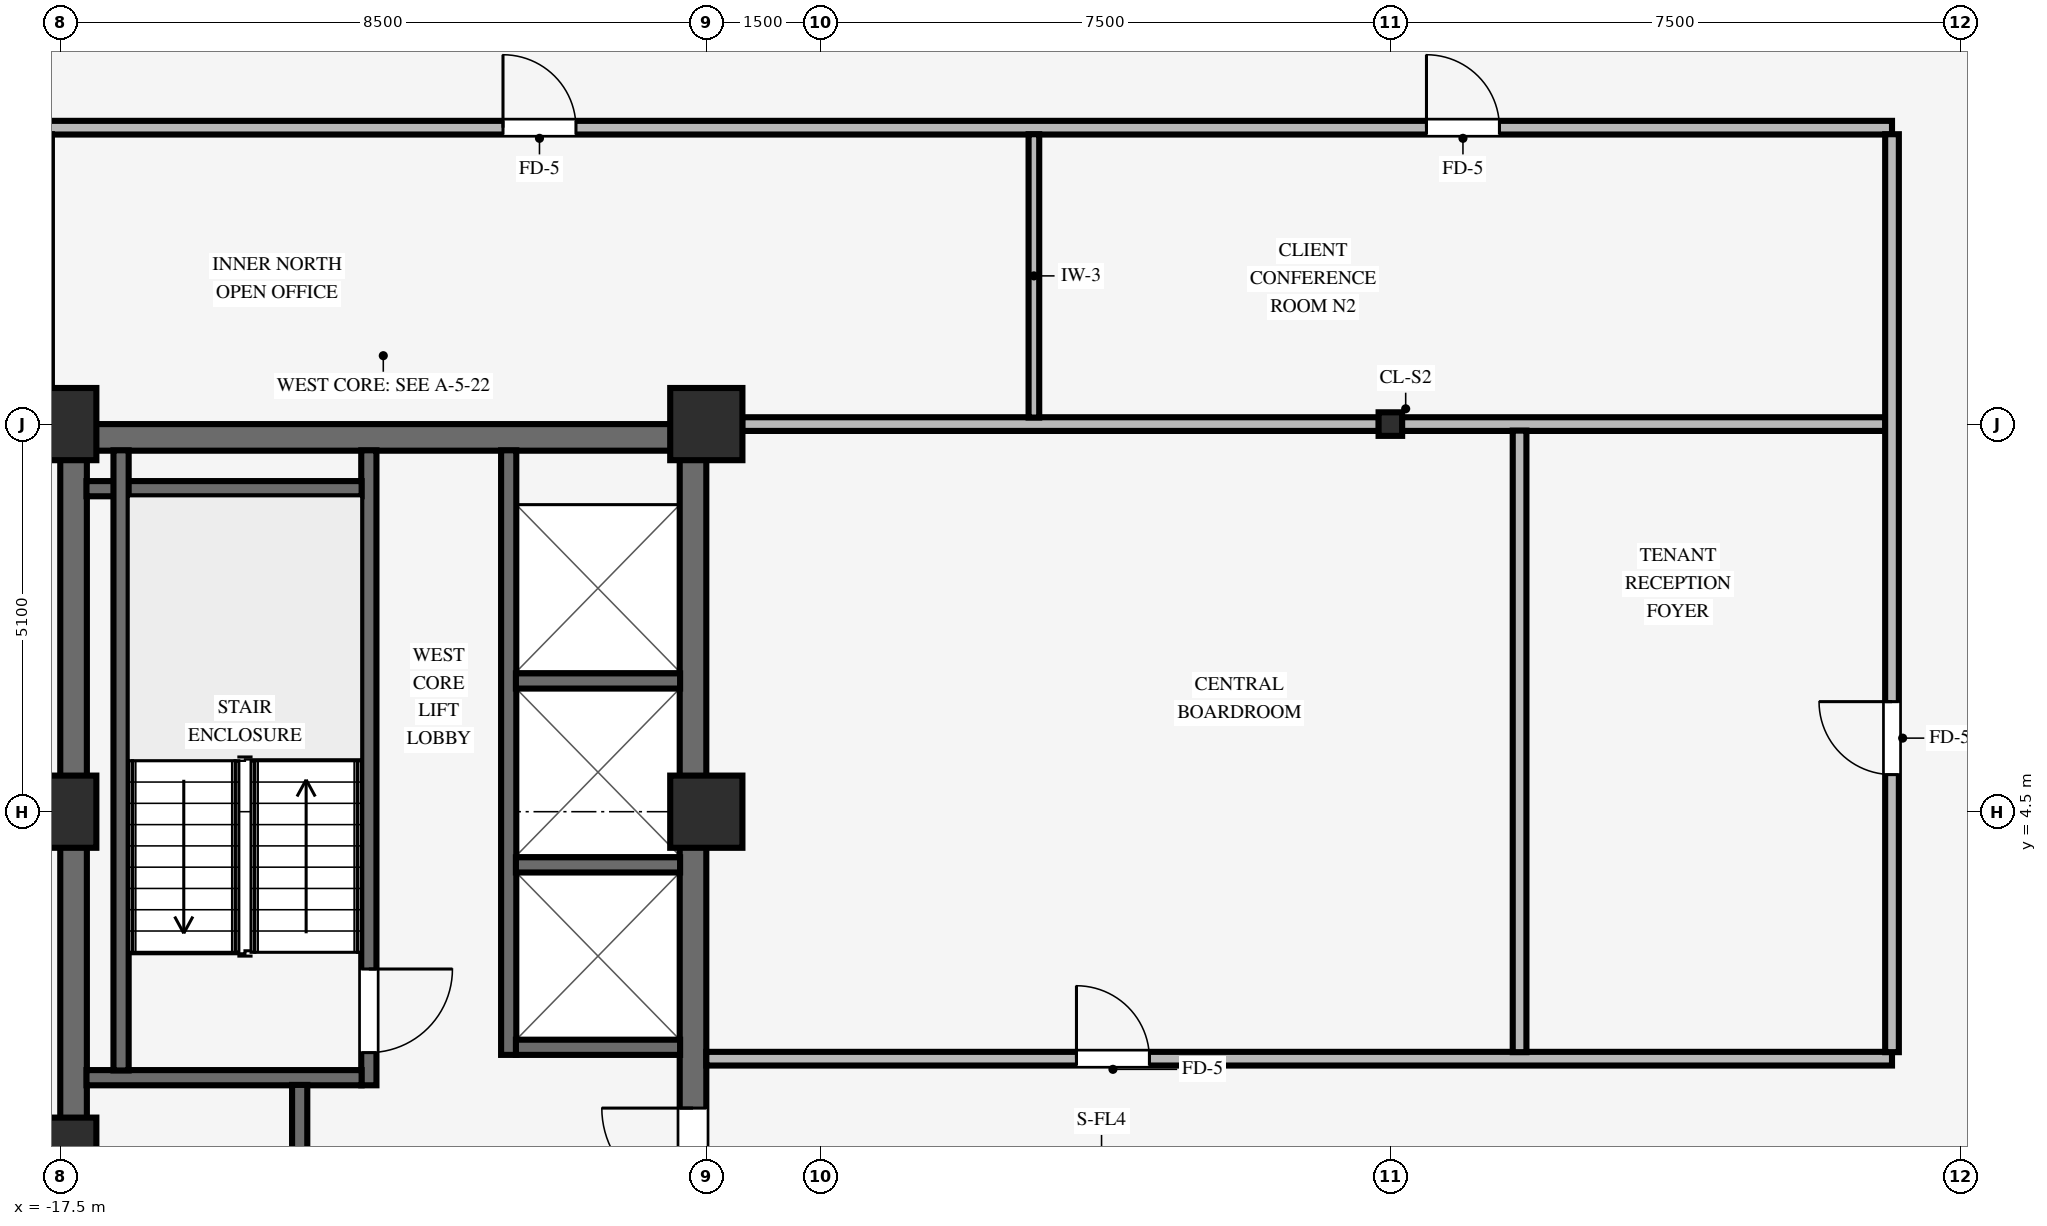
"""IFC4 building model, lengths in metres.
Left out: names, types, materials, properties, quantities, classifications, styles, units other than length and angle.
Written with IfcOpenShell. Run it as: python <this file> out.ifc"""

import sys

from ifc_helpers import new_model, si_unit, direction, frame, frame_2d, origin, origin_2d, place, context, subcontext, project, spatial, rectangle, i_section, extrude, source, transform, mapped, element, fill, save


model = new_model("IFC4")
c1 = context("Model", 3, precision=1e-05, world=origin(), true_north=direction((0.0, 1.0)))
c2 = subcontext(c1, "Body", "Model", "MODEL_VIEW")
j1 = project(units=[si_unit("LENGTHUNIT", "METRE"), si_unit("PLANEANGLEUNIT", "RADIAN")], contexts=[c1])
p1 = place(None, origin())
s1 = spatial("IfcSite", under=j1, at=p1, CompositionType="ELEMENT")
p2 = place(p1, origin())
s2 = spatial("IfcBuilding", under=s1, at=p2, CompositionType="ELEMENT")
p3 = place(p2, frame((0.0, 0.0, 216.45)))
s3 = spatial("IfcBuildingStorey", under=s2, at=p3, CompositionType="ELEMENT", Elevation=216.45)
p4 = place(p3, frame((-17.5, 9.425, 0.0), z_axis=(0.0, 0.0, 1.0), x_axis=(1.0, 0.0, 0.0)))
e1 = element("IfcWall", 1, at=p4, inside=s3, PredefinedType="SHEAR", context=c2, shape_type="SweptSolid", body=[
    extrude(rectangle(XDim=8.5, YDim=0.35, at=frame_2d((4.25, 0.0))), origin(), (0.0, 0.0, 1.0), 3.37),
])
p5 = place(p3, frame((-17.325, -9.255, 0.0), z_axis=(0.0, 0.0, 1.0), x_axis=(0.0, 1.0, 0.0)))
e2 = element("IfcWall", 2, at=p5, inside=s3, PredefinedType="SHEAR", context=c2, shape_type="SweptSolid", body=[
    extrude(rectangle(XDim=18.51, YDim=0.35, at=frame_2d((9.255, 0.0))), origin(), (0.0, 0.0, 1.0), 3.37),
])
p6 = place(p3, frame((-9.175, -9.255, 0.0), z_axis=(0.0, 0.0, 1.0), x_axis=(0.0, 1.0, 0.0)))
e3 = element("IfcWall", 3, at=p6, inside=s3, PredefinedType="SHEAR", context=c2, shape_type="SweptSolid", body=[
    extrude(rectangle(XDim=18.51, YDim=0.35, at=frame_2d((9.255, 0.0))), origin(), (0.0, 0.0, 1.0), 3.37),
])
p7 = place(p6, frame((8.655, 0.0, 0.0)))
e4 = element("IfcOpeningElement", 4, at=p7, cuts=e3, PredefinedType="OPENING", context=c2, shape_type="SweptSolid", body=[
    extrude(rectangle(XDim=1.2, YDim=2.15, at=frame_2d((0.6, 1.075))), frame((0.0, 0.185, 0.0), z_axis=(0.0, -1.0, 0.0), x_axis=(1.0, 0.0, 0.0)), (0.0, 0.0, 1.0), 0.37),
])
for number, where, z_axis, x_axis in (
    (5, (-17.5, 4.5, 0.0), (0.0, 0.0, 1.0), (1.0, 0.0, 0.0)),
    (6, (-17.5, 9.6, 0.0), (0.0, 0.0, 1.0), (1.0, 0.0, 0.0)),
    (7, (-9.0, 4.5, 0.0), (0.0, 0.0, 1.0), (1.0, 0.0, 0.0)),
    (8, (-9.0, 9.6, 0.0), (0.0, 0.0, 1.0), (1.0, 0.0, 0.0)),
    (9, (-17.5, 0.0, 0.0), (0.0, 0.0, 1.0), (1.0, 0.0, 0.0)),
):
    element("IfcColumn", number, at=place(p3, frame(where, z_axis=z_axis, x_axis=x_axis)), inside=s3, PredefinedType="COLUMN", context=c2, shape_type="SweptSolid", body=[
        extrude(rectangle(XDim=0.95, YDim=0.95, at=origin_2d()), origin(), (0.0, 0.0, 1.0), 3.37),
    ])
p8 = place(p3, frame((0.0, 9.6, 0.0), z_axis=(0.0, 0.0, 1.0), x_axis=(1.0, 0.0, 0.0)))
e10 = element("IfcColumn", 10, at=p8, inside=s3, PredefinedType="COLUMN", context=c2, shape_type="SweptSolid", body=[
    extrude(i_section(OverallWidth=0.31, OverallDepth=0.31, WebThickness=0.015, FlangeThickness=0.015, FilletRadius=0.015, at=origin_2d()), origin(), (0.0, 0.0, 1.0), 3.37),
])
p9 = place(p3, frame((-13.44, 0.9, 0.0), z_axis=(0.0, 0.0, 1.0), x_axis=(0.0, 1.0, 0.0)))
e11 = element("IfcWall", 11, at=p9, inside=s3, PredefinedType="SHEAR", context=c2, shape_type="SweptSolid", body=[
    extrude(rectangle(XDim=8.355, YDim=0.2, at=frame_2d((4.177, 0.0))), origin(), (0.0, 0.0, 1.0), 3.37),
])
p10 = place(p9, frame((1.53, 0.0, 0.0), z_axis=(0.0, 0.0, 1.0), x_axis=(-1.0, 0.0, 0.0)))
e12 = element("IfcOpeningElement", 12, at=p10, cuts=e11, PredefinedType="OPENING", context=c2, shape_type="SweptSolid", body=[
    extrude(rectangle(XDim=1.1, YDim=2.15, at=frame_2d((0.55, 1.075))), frame((0.0, 0.11, 0.0), z_axis=(0.0, -1.0, 0.0), x_axis=(1.0, 0.0, 0.0)), (0.0, 0.0, 1.0), 0.22),
])
for number, where, z_axis, x_axis in (
    (13, (-17.155, 1.0, 0.0), (0.0, 0.0, 1.0), (1.0, 0.0, 0.0)),
    (14, (-17.155, 8.75, 0.0), (0.0, 0.0, 1.0), (1.0, 0.0, 0.0)),
):
    element("IfcWall", number, at=place(p3, frame(where, z_axis=z_axis, x_axis=x_axis)), inside=s3, PredefinedType="SHEAR", context=c2, shape_type="SweptSolid", body=[
        extrude(rectangle(XDim=3.62, YDim=0.2, at=frame_2d((1.81, 0.0))), origin(), (0.0, 0.0, 1.0), 3.37),
    ])
p11 = place(p3, frame((-16.7, 1.095, 0.0), z_axis=(0.0, 0.0, 1.0), x_axis=(0.0, 1.0, 0.0)))
e15 = element("IfcWall", 15, at=p11, inside=s3, PredefinedType="SHEAR", context=c2, shape_type="SweptSolid", body=[
    extrude(rectangle(XDim=8.16, YDim=0.2, at=frame_2d((4.08, 0.0))), origin(), (0.0, 0.0, 1.0), 3.37),
])
p12 = place(p3, frame((-14.35, -6.2, 0.0), z_axis=(0.0, 0.0, 1.0), x_axis=(0.0, 1.0, 0.0)))
e16 = element("IfcWall", 16, at=p12, inside=s3, PredefinedType="SHEAR", context=c2, shape_type="SweptSolid", body=[
    extrude(rectangle(XDim=7.105, YDim=0.2, at=frame_2d((3.552, 0.0))), origin(), (0.0, 0.0, 1.0), 3.37),
])
p13 = place(p12, frame((5.69, 0.0, 0.0), z_axis=(0.0, 0.0, 1.0), x_axis=(-1.0, 0.0, 0.0)))
e17 = element("IfcOpeningElement", 17, at=p13, cuts=e16, PredefinedType="OPENING", context=c2, shape_type="SweptSolid", body=[
    extrude(rectangle(XDim=0.88, YDim=2.1, at=frame_2d((0.44, 1.05))), frame((0.0, 0.11, 0.0), z_axis=(0.0, -1.0, 0.0), x_axis=(1.0, 0.0, 0.0)), (0.0, 0.0, 1.0), 0.22),
])
p14 = place(p12, frame((1.15, 0.0, 0.0)))
e18 = element("IfcOpeningElement", 18, at=p14, cuts=e16, PredefinedType="OPENING", context=c2, shape_type="SweptSolid", body=[
    extrude(rectangle(XDim=1.3, YDim=2.2, at=frame_2d((0.65, 1.1))), frame((0.0, 0.11, 0.0), z_axis=(0.0, -1.0, 0.0), x_axis=(1.0, 0.0, 0.0)), (0.0, 0.0, 1.0), 0.22),
])
p15 = place(p3, frame((-11.6, 1.3, 0.0), z_axis=(0.0, 0.0, 1.0), x_axis=(0.0, 1.0, 0.0)))
e19 = element("IfcWall", 19, at=p15, inside=s3, PredefinedType="SHEAR", context=c2, shape_type="SweptSolid", body=[
    extrude(rectangle(XDim=7.955, YDim=0.2, at=frame_2d((3.978, 0.0))), origin(), (0.0, 0.0, 1.0), 3.37),
])
for number, where, z_axis, x_axis in (
    (20, (-11.505, 1.4, 0.0), (0.0, 0.0, 1.0), (1.0, 0.0, 0.0)),
    (21, (-11.505, 3.8, 0.0), (0.0, 0.0, 1.0), (1.0, 0.0, 0.0)),
    (22, (-11.505, 6.22, 0.0), (0.0, 0.0, 1.0), (1.0, 0.0, 0.0)),
):
    element("IfcWall", number, at=place(p3, frame(where, z_axis=z_axis, x_axis=x_axis)), inside=s3, PredefinedType="SHEAR", context=c2, shape_type="SweptSolid", body=[
        extrude(rectangle(XDim=2.16, YDim=0.2, at=frame_2d((1.08, 0.0))), origin(), (0.0, 0.0, 1.0), 3.37),
    ])
p16 = place(p3, frame((-9.0, 1.25, 0.0), z_axis=(0.0, 0.0, 1.0), x_axis=(1.0, 0.0, 0.0)))
e23 = element("IfcWall", 23, at=p16, inside=s3, PredefinedType="PARTITIONING", context=c2, shape_type="SweptSolid", body=[
    extrude(rectangle(XDim=15.6, YDim=0.18, at=frame_2d((7.8, 0.0))), origin(), (0.0, 0.0, 1.0), 3.36),
])
p17 = place(p16, frame((4.87, 0.0, 0.0)))
e24 = element("IfcOpeningElement", 24, at=p17, cuts=e23, PredefinedType="OPENING", context=c2, shape_type="SweptSolid", body=[
    extrude(rectangle(XDim=0.96, YDim=2.1, at=frame_2d((0.48, 1.05))), frame((0.0, 0.1, 0.0), z_axis=(0.0, -1.0, 0.0), x_axis=(1.0, 0.0, 0.0)), (0.0, 0.0, 1.0), 0.2),
])
p18 = place(p3, frame((-8.529, 9.6, 0.0), z_axis=(0.0, 0.0, 1.0), x_axis=(1.0, 0.0, 0.0)))
e25 = element("IfcWall", 25, at=p18, inside=s3, PredefinedType="PARTITIONING", context=c2, shape_type="SweptSolid", body=[
    extrude(rectangle(XDim=8.378, YDim=0.18, at=frame_2d((4.189, 0.0))), origin(), (0.0, 0.0, 1.0), 2.405),
])
p19 = place(p3, frame((0.151, 9.6, 0.0), z_axis=(0.0, 0.0, 1.0), x_axis=(1.0, 0.0, 0.0)))
e26 = element("IfcWall", 26, at=p19, inside=s3, PredefinedType="PARTITIONING", context=c2, shape_type="SweptSolid", body=[
    extrude(rectangle(XDim=6.363, YDim=0.18, at=frame_2d((3.182, 0.0))), origin(), (0.0, 0.0, 1.0), 2.405),
])
p20 = place(p3, frame((-17.7, 13.5, 0.0), z_axis=(0.0, 0.0, 1.0), x_axis=(1.0, 0.0, 0.0)))
e27 = element("IfcWall", 27, at=p20, inside=s3, PredefinedType="PARTITIONING", context=c2, shape_type="SweptSolid", body=[
    extrude(rectangle(XDim=24.3, YDim=0.18, at=frame_2d((12.15, 0.0))), origin(), (0.0, 0.0, 1.0), 3.008),
])
p21 = place(p20, frame((6.025, 0.0, 0.0)))
e28 = element("IfcOpeningElement", 28, at=p21, cuts=e27, PredefinedType="OPENING", context=c2, shape_type="SweptSolid", body=[
    extrude(rectangle(XDim=0.96, YDim=2.1, at=frame_2d((0.48, 1.05))), frame((0.0, 0.1, 0.0), z_axis=(0.0, -1.0, 0.0), x_axis=(1.0, 0.0, 0.0)), (0.0, 0.0, 1.0), 0.2),
])
p22 = place(p20, frame((18.175, 0.0, 0.0)))
e29 = element("IfcOpeningElement", 29, at=p22, cuts=e27, PredefinedType="OPENING", context=c2, shape_type="SweptSolid", body=[
    extrude(rectangle(XDim=0.96, YDim=2.1, at=frame_2d((0.48, 1.05))), frame((0.0, 0.1, 0.0), z_axis=(0.0, -1.0, 0.0), x_axis=(1.0, 0.0, 0.0)), (0.0, 0.0, 1.0), 0.2),
])
p23 = place(p3, frame((-4.69, 9.686, 0.0), z_axis=(0.0, 0.0, 1.0), x_axis=(0.0, 1.0, 0.0)))
e30 = element("IfcWall", 30, at=p23, inside=s3, PredefinedType="PARTITIONING", context=c2, shape_type="SweptSolid", body=[
    extrude(rectangle(XDim=3.728, YDim=0.14, at=frame_2d((1.864, 0.0))), origin(), (0.0, 0.0, 1.0), 3.36),
])
p24 = place(p3, frame((1.7, 1.336, 0.0), z_axis=(0.0, 0.0, 1.0), x_axis=(0.0, 1.0, 0.0)))
e31 = element("IfcWall", 31, at=p24, inside=s3, PredefinedType="PARTITIONING", context=c2, shape_type="SweptSolid", body=[
    extrude(rectangle(XDim=8.178, YDim=0.18, at=frame_2d((4.089, 0.0))), origin(), (0.0, 0.0, 1.0), 3.36),
])
p25 = place(p3, frame((6.6, 1.336, 0.0), z_axis=(0.0, 0.0, 1.0), x_axis=(0.0, 1.0, 0.0)))
e32 = element("IfcWall", 32, at=p25, inside=s3, PredefinedType="PARTITIONING", context=c2, shape_type="SweptSolid", body=[
    extrude(rectangle(XDim=12.078, YDim=0.18, at=frame_2d((6.039, 0.0))), origin(), (0.0, 0.0, 1.0), 3.36),
])
p26 = place(p25, frame((3.652, 0.0, 0.0)))
e33 = element("IfcOpeningElement", 33, at=p26, cuts=e32, PredefinedType="OPENING", context=c2, shape_type="SweptSolid", body=[
    extrude(rectangle(XDim=0.96, YDim=2.1, at=frame_2d((0.48, 1.05))), frame((0.0, 0.1, 0.0), z_axis=(0.0, -1.0, 0.0), x_axis=(1.0, 0.0, 0.0)), (0.0, 0.0, 1.0), 0.2),
])
m1 = source(origin(), c2, "Body", "SweptSolid", [
    extrude(rectangle(XDim=1.1, YDim=2.15, at=frame_2d((0.55, 1.075))), frame((0.0, 0.025, 0.0), z_axis=(0.0, -1.0, 0.0), x_axis=(1.0, 0.0, 0.0)), (0.0, 0.0, 1.0), 0.05),
])
p27 = place(p10, origin())
e34 = element("IfcDoor", 34, at=p27, inside=s3, OperationType="SINGLE_SWING_LEFT", PredefinedType="DOOR", context=c2, shape_type="MappedRepresentation", body=[
    mapped(m1, transform((0.0, 0.0, 0.0), scale=1.0)),
])
fill(e12, e34)
m2 = source(origin(), c2, "Body", "SweptSolid", [
    extrude(rectangle(XDim=1.2, YDim=2.15, at=frame_2d((0.6, 1.075))), frame((0.0, 0.025, 0.0), z_axis=(0.0, -1.0, 0.0), x_axis=(1.0, 0.0, 0.0)), (0.0, 0.0, 1.0), 0.05),
])
p28 = place(p7, origin())
e35 = element("IfcDoor", 35, at=p28, inside=s3, OperationType="SINGLE_SWING_RIGHT", PredefinedType="DOOR", context=c2, shape_type="MappedRepresentation", body=[
    mapped(m2, transform((0.0, 0.0, 0.0), scale=1.0)),
])
fill(e4, e35)
m3 = source(origin(), c2, "Body", "SweptSolid", [
    extrude(rectangle(XDim=0.96, YDim=2.1, at=frame_2d((0.48, 1.05))), frame((0.0, 0.025, 0.0), z_axis=(0.0, -1.0, 0.0), x_axis=(1.0, 0.0, 0.0)), (0.0, 0.0, 1.0), 0.05),
])
p29 = place(p21, origin())
e36 = element("IfcDoor", 36, at=p29, inside=s3, OperationType="SINGLE_SWING_LEFT", PredefinedType="DOOR", context=c2, shape_type="MappedRepresentation", body=[
    mapped(m3, transform((0.0, 0.0, 0.0), scale=1.0)),
])
fill(e28, e36)
p30 = place(p22, origin())
e37 = element("IfcDoor", 37, at=p30, inside=s3, OperationType="SINGLE_SWING_LEFT", PredefinedType="DOOR", context=c2, shape_type="MappedRepresentation", body=[
    mapped(m3, transform((0.0, 0.0, 0.0), scale=1.0)),
])
fill(e29, e37)
p31 = place(p17, origin())
e38 = element("IfcDoor", 38, at=p31, inside=s3, OperationType="SINGLE_SWING_LEFT", PredefinedType="DOOR", context=c2, shape_type="MappedRepresentation", body=[
    mapped(m3, transform((0.0, 0.0, 0.0), scale=1.0)),
])
fill(e24, e38)
p32 = place(p26, origin())
e39 = element("IfcDoor", 39, at=p32, inside=s3, OperationType="SINGLE_SWING_RIGHT", PredefinedType="DOOR", context=c2, shape_type="MappedRepresentation", body=[
    mapped(m3, transform((0.0, 0.0, 0.0), scale=1.0)),
])
fill(e33, e39)
save(model, sys.argv[1])
